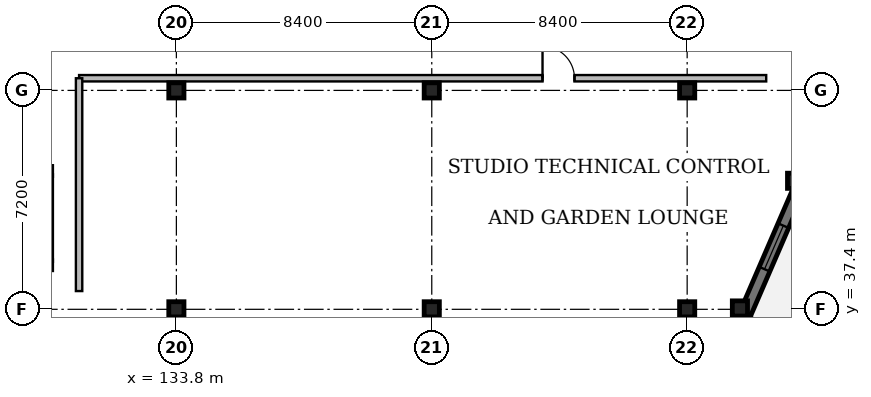
"""IFC4 building model, lengths in metres.
Left out: names, types, materials, properties, quantities, classifications, styles, units other than length and angle.
Written with IfcOpenShell. Run it as: python <this file> out.ifc"""

import sys

from ifc_helpers import new_model, si_unit, direction, frame, frame_2d, origin, origin_2d, place, context, subcontext, project, spatial, rectangle, extrude, element, fill, save


model = new_model("IFC4")
c1 = context("Model", 3, precision=1e-05, world=origin(), true_north=direction((0.0, 1.0)))
c2 = subcontext(c1, "Body", "Model", "MODEL_VIEW")
j1 = project(units=[si_unit("LENGTHUNIT", "METRE"), si_unit("PLANEANGLEUNIT", "RADIAN")], contexts=[c1])
p1 = place(None, origin())
s1 = spatial("IfcSite", under=j1, at=p1, CompositionType="ELEMENT")
p2 = place(p1, origin())
s2 = spatial("IfcBuilding", under=s1, at=p2, CompositionType="ELEMENT")
p3 = place(p2, frame((0.0, 0.0, 9.0)))
s3 = spatial("IfcBuildingStorey", under=s2, at=p3, CompositionType="ELEMENT", Elevation=9.0)
for number, where, z_axis, x_axis in (
    (1, (133.8, 37.4, 0.0), (0.0, 0.0, 1.0), (1.0, 0.0, 0.0)),
    (2, (133.8, 44.6, 0.0), (0.0, 0.0, 1.0), (1.0, 0.0, 0.0)),
    (3, (142.2, 37.4, 0.0), (0.0, 0.0, 1.0), (1.0, 0.0, 0.0)),
    (4, (142.2, 44.6, 0.0), (0.0, 0.0, 1.0), (1.0, 0.0, 0.0)),
    (5, (150.6, 37.4, 0.0), (0.0, 0.0, 1.0), (1.0, 0.0, 0.0)),
    (6, (150.6, 44.6, 0.0), (0.0, 0.0, 1.0), (1.0, 0.0, 0.0)),
):
    element("IfcColumn", number, at=place(p3, frame(where, z_axis=z_axis, x_axis=x_axis)), inside=s3, PredefinedType="COLUMN", context=c2, shape_type="SweptSolid", body=[
        extrude(rectangle(XDim=0.5, YDim=0.5, at=origin_2d()), origin(), (0.0, 0.0, 1.0), 4.06),
    ])
for number, where, z_axis, x_axis in (
    (7, (154.15, 41.627, 0.0), (0.0, 0.0, 1.0), (1.0, 0.0, 0.0)),
    (8, (152.335, 37.428, 0.0), (0.0, 0.0, 1.0), (1.0, 0.0, 0.0)),
):
    element("IfcColumn", number, at=place(p3, frame(where, z_axis=z_axis, x_axis=x_axis)), inside=s3, PredefinedType="COLUMN", context=c2, shape_type="SweptSolid", body=[
        extrude(rectangle(XDim=0.5, YDim=0.5, at=origin_2d()), origin(), (0.0, 0.0, 1.0), 4.18),
    ])
p4 = place(p3, frame((154.317, 41.433, 0.0), z_axis=(0.0, 0.0, 1.0), x_axis=(-0.396771328502, -0.917917486967, 0.0)))
e9 = element("IfcWall", 9, at=p4, inside=s3, PredefinedType="SOLIDWALL", context=c2, shape_type="SweptSolid", body=[
    extrude(rectangle(XDim=4.532, YDim=0.38, at=frame_2d((2.266, 0.0))), origin(), (0.0, 0.0, 1.0), 4.24),
])
p5 = place(p4, frame((1.396, 0.0, 0.95)))
e10 = element("IfcOpeningElement", 10, at=p5, cuts=e9, PredefinedType="OPENING", context=c2, shape_type="SweptSolid", body=[
    extrude(rectangle(XDim=1.56, YDim=2.0, at=frame_2d((0.78, 1.0))), frame((0.0, 0.21, 0.0), z_axis=(0.0, -1.0, 0.0), x_axis=(1.0, 0.0, 0.0)), (0.0, 0.0, 1.0), 0.42),
])
p6 = place(p3, frame((152.519, 37.273, 0.0), z_axis=(0.0, 0.0, 1.0), x_axis=(-0.589554570805, -0.807728548488, 0.0)))
e11 = element("IfcWall", 11, at=p6, inside=s3, PredefinedType="SOLIDWALL", context=c2, shape_type="SweptSolid", body=[
    extrude(rectangle(XDim=4.532, YDim=0.38, at=frame_2d((2.266, 0.0))), origin(), (0.0, 0.0, 1.0), 4.24),
])
p7 = place(p6, frame((1.466, 0.0, 0.0)))
e12 = element("IfcOpeningElement", 12, at=p7, cuts=e11, PredefinedType="OPENING", context=c2, shape_type="SweptSolid", body=[
    extrude(rectangle(XDim=1.6, YDim=2.2, at=frame_2d((0.8, 1.1))), frame((0.0, 0.21, 0.0), z_axis=(0.0, -1.0, 0.0), x_axis=(1.0, 0.0, 0.0)), (0.0, 0.0, 1.0), 0.42),
])
p8 = place(p3, frame((130.6, 45.0, 0.0), z_axis=(0.0, 0.0, 1.0), x_axis=(1.0, 0.0, 0.0)))
e13 = element("IfcWall", 13, at=p8, inside=s3, PredefinedType="PARTITIONING", context=c2, shape_type="SweptSolid", body=[
    extrude(rectangle(XDim=22.6, YDim=0.21, at=frame_2d((11.3, 0.0))), origin(), (0.0, 0.0, 1.0), 3.96),
])
p9 = place(p8, frame((15.243, 0.0, 0.0)))
e14 = element("IfcOpeningElement", 14, at=p9, cuts=e13, PredefinedType="OPENING", context=c2, shape_type="SweptSolid", body=[
    extrude(rectangle(XDim=1.05, YDim=2.15, at=frame_2d((0.525, 1.075))), frame((0.0, 0.125, 0.0), z_axis=(0.0, -1.0, 0.0), x_axis=(1.0, 0.0, 0.0)), (0.0, 0.0, 1.0), 0.25),
])
p10 = place(p3, frame((130.6, 38.0, 0.0), z_axis=(0.0, 0.0, 1.0), x_axis=(0.0, 1.0, 0.0)))
e15 = element("IfcWall", 15, at=p10, inside=s3, PredefinedType="PARTITIONING", context=c2, shape_type="SweptSolid", body=[
    extrude(rectangle(XDim=7.0, YDim=0.21, at=frame_2d((3.5, 0.0))), origin(), (0.0, 0.0, 1.0), 3.96),
])
p11 = place(p5, origin())
e16 = element("IfcWindow", 16, at=p11, inside=s3, PartitioningType="SINGLE_PANEL", PredefinedType="WINDOW", context=c2, shape_type="SweptSolid", body=[
    extrude(rectangle(XDim=1.56, YDim=2.0, at=frame_2d((0.78, 1.0))), frame((0.0, 0.03, 0.0), z_axis=(0.0, -1.0, 0.0), x_axis=(1.0, 0.0, 0.0)), (0.0, 0.0, 1.0), 0.06),
])
fill(e10, e16)
p12 = place(p9, origin())
e17 = element("IfcDoor", 17, at=p12, inside=s3, OperationType="SINGLE_SWING_LEFT", PredefinedType="DOOR", context=c2, shape_type="SweptSolid", body=[
    extrude(rectangle(XDim=1.05, YDim=2.15, at=frame_2d((0.525, 1.075))), frame((0.0, 0.025, 0.0), z_axis=(0.0, -1.0, 0.0), x_axis=(1.0, 0.0, 0.0)), (0.0, 0.0, 1.0), 0.05),
])
fill(e14, e17)
save(model, sys.argv[1])
